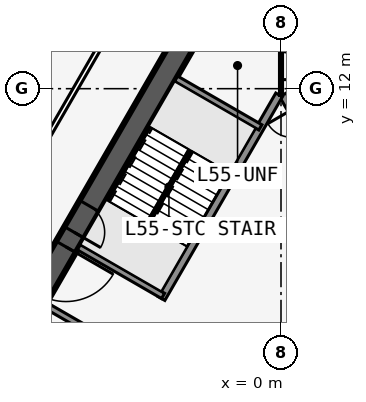
"""IFC4 building model, lengths in metres.
Left out: names, types, materials, properties, quantities, classifications, styles, units other than length and angle.
Written with IfcOpenShell. Run it as: python <this file> out.ifc"""

import sys

from ifc_helpers import new_model, si_unit, direction, frame, frame_2d, origin, place, context, subcontext, project, spatial, rectangle, extrude, element, fill, save


model = new_model("IFC4")
c1 = context("Model", 3, precision=1e-05, world=origin(), true_north=direction((0.0, 1.0)))
c2 = subcontext(c1, "Body", "Model", "MODEL_VIEW")
j1 = project(units=[si_unit("LENGTHUNIT", "METRE"), si_unit("PLANEANGLEUNIT", "RADIAN")], contexts=[c1])
p1 = place(None, origin())
s1 = spatial("IfcSite", under=j1, at=p1, CompositionType="ELEMENT")
p2 = place(p1, origin())
s2 = spatial("IfcBuilding", under=s1, at=p2, CompositionType="ELEMENT")
p3 = place(p2, frame((0.0, 0.0, 208.1)))
s3 = spatial("IfcBuildingStorey", under=s2, at=p3, CompositionType="ELEMENT", Elevation=208.1)
p4 = place(p3, frame((16.5, -9.526, 0.0), z_axis=(0.0, 0.0, 1.0), x_axis=(-0.499999749417, 0.866025548458, 0.0)))
e1 = element("IfcWall", 1, at=p4, inside=s3, PredefinedType="SHEAR", context=c2, shape_type="SweptSolid", body=[
    extrude(rectangle(XDim=33.0, YDim=0.75, at=frame_2d((16.5, 0.0))), origin(), (0.0, 0.0, 1.0), 3.6),
])
p5 = place(p4, frame((14.15, 0.0, 0.0)))
e2 = element("IfcOpeningElement", 2, at=p5, cuts=e1, PredefinedType="OPENING", context=c2, shape_type="SweptSolid", body=[
    extrude(rectangle(XDim=1.8, YDim=2.13, at=frame_2d((0.9, 1.065))), frame((0.0, 0.385, 0.0), z_axis=(0.0, -1.0, 0.0), x_axis=(1.0, 0.0, 0.0)), (0.0, 0.0, 1.0), 0.77),
])
p6 = place(p4, frame((12.6, 0.0, 0.0)))
e3 = element("IfcOpeningElement", 3, at=p6, cuts=e1, PredefinedType="OPENING", context=c2, shape_type="SweptSolid", body=[
    extrude(rectangle(XDim=1.0, YDim=2.13, at=frame_2d((0.5, 1.065))), frame((0.0, 0.385, 0.0), z_axis=(0.0, -1.0, 0.0), x_axis=(1.0, 0.0, 0.0)), (0.0, 0.0, 1.0), 0.77),
])
p7 = place(p3, frame((5.379, 2.586, 0.0), z_axis=(0.0, 0.0, 1.0), x_axis=(-0.500001375892, 0.866024609411, 0.0)))
e4 = element("IfcWall", 4, at=p7, inside=s3, PredefinedType="SOLIDWALL", context=c2, shape_type="SweptSolid", body=[
    extrude(rectangle(XDim=10.633, YDim=0.25, at=frame_2d((5.316, 0.0))), origin(), (0.0, 0.0, 1.0), 3.435),
])
p8 = place(p7, frame((9.164, 0.0, 0.0)))
e5 = element("IfcOpeningElement", 5, at=p8, cuts=e4, PredefinedType="OPENING", context=c2, shape_type="SweptSolid", body=[
    extrude(rectangle(XDim=0.9, YDim=2.13, at=frame_2d((0.45, 1.065))), frame((0.0, 0.135, 0.0), z_axis=(0.0, -1.0, 0.0), x_axis=(1.0, 0.0, 0.0)), (0.0, 0.0, 1.0), 0.27),
])
p9 = place(p7, frame((1.0, 0.0, 0.0)))
e6 = element("IfcOpeningElement", 6, at=p9, cuts=e4, PredefinedType="OPENING", context=c2, shape_type="SweptSolid", body=[
    extrude(rectangle(XDim=1.1, YDim=2.13, at=frame_2d((0.55, 1.065))), frame((0.0, 0.135, 0.0), z_axis=(0.0, -1.0, 0.0), x_axis=(1.0, 0.0, 0.0)), (0.0, 0.0, 1.0), 0.27),
])
p10 = place(p7, frame((3.9, 0.0, 0.0)))
e7 = element("IfcOpeningElement", 7, at=p10, cuts=e4, PredefinedType="OPENING", context=c2, shape_type="SweptSolid", body=[
    extrude(rectangle(XDim=1.1, YDim=2.13, at=frame_2d((0.55, 1.065))), frame((0.0, 0.135, 0.0), z_axis=(0.0, -1.0, 0.0), x_axis=(1.0, 0.0, 0.0)), (0.0, 0.0, 1.0), 0.27),
])
p11 = place(p7, frame((6.8, 0.0, 0.0)))
e8 = element("IfcOpeningElement", 8, at=p11, cuts=e4, PredefinedType="OPENING", context=c2, shape_type="SweptSolid", body=[
    extrude(rectangle(XDim=1.1, YDim=2.13, at=frame_2d((0.55, 1.065))), frame((0.0, 0.135, 0.0), z_axis=(0.0, -1.0, 0.0), x_axis=(1.0, 0.0, 0.0)), (0.0, 0.0, 1.0), 0.27),
])
p12 = place(p3, frame((0.0, 19.052, 0.0), z_axis=(0.0, 0.0, 1.0), x_axis=(-0.499999749417, -0.866025548458, 0.0)))
e9 = element("IfcWall", 9, at=p12, inside=s3, PredefinedType="SHEAR", context=c2, shape_type="SweptSolid", body=[
    extrude(rectangle(XDim=33.0, YDim=0.75, at=frame_2d((16.5, 0.0))), origin(), (0.0, 0.0, 1.0), 3.6),
])
p13 = place(p12, frame((14.15, 0.0, 0.0)))
e10 = element("IfcOpeningElement", 10, at=p13, cuts=e9, PredefinedType="OPENING", context=c2, shape_type="SweptSolid", body=[
    extrude(rectangle(XDim=1.8, YDim=2.13, at=frame_2d((0.9, 1.065))), frame((0.0, 0.385, 0.0), z_axis=(0.0, -1.0, 0.0), x_axis=(1.0, 0.0, 0.0)), (0.0, 0.0, 1.0), 0.77),
])
p14 = place(p12, frame((12.6, 0.0, 0.0)))
e11 = element("IfcOpeningElement", 11, at=p14, cuts=e9, PredefinedType="OPENING", context=c2, shape_type="SweptSolid", body=[
    extrude(rectangle(XDim=1.0, YDim=2.13, at=frame_2d((0.5, 1.065))), frame((0.0, 0.385, 0.0), z_axis=(0.0, -1.0, 0.0), x_axis=(1.0, 0.0, 0.0)), (0.0, 0.0, 1.0), 0.77),
])
p15 = place(p3, frame((-0.062, 11.794, 0.0), z_axis=(0.0, 0.0, 1.0), x_axis=(-0.500006680225, -0.86602154692, 0.0)))
e12 = element("IfcWall", 12, at=p15, inside=s3, PredefinedType="SOLIDWALL", context=c2, shape_type="SweptSolid", body=[
    extrude(rectangle(XDim=7.733, YDim=0.25, at=frame_2d((3.866, 0.0))), origin(), (0.0, 0.0, 1.0), 3.435),
])
for number, where, z_axis, x_axis in (
    (13, (-0.679, 10.727, 0.0), (0.0, 0.0, 1.0), (-0.866, 0.5, 0.0)),
    (14, (-3.879, 5.184, 0.0), (0.0, 0.0, 1.0), (-0.866, 0.5, 0.0)),
    (15, (-4.979, 3.279, 0.0), (0.0, 0.0, 1.0), (-0.866, 0.5, 0.0)),
):
    element("IfcWall", number, at=place(p3, frame(where, z_axis=z_axis, x_axis=x_axis)), inside=s3, PredefinedType="SOLIDWALL", context=c2, shape_type="SweptSolid", body=[
        extrude(rectangle(XDim=3.2, YDim=0.2, at=frame_2d((1.6, 0.0))), origin(), (0.0, 0.0, 1.0), 3.435),
    ])
p16 = place(p3, frame((-0.425, 22.966, 0.0), z_axis=(0.0, 0.0, 1.0), x_axis=(-0.500000265775, -0.866025250339, 0.0)))
e16 = element("IfcWall", 16, at=p16, inside=s3, PredefinedType="PARTITIONING", context=c2, shape_type="SweptSolid", body=[
    extrude(rectangle(XDim=39.354, YDim=0.15, at=frame_2d((19.677, 0.0))), origin(), (0.0, 0.0, 1.0), 3.435),
])
p17 = place(p16, frame((1.102, 0.0, 0.0)))
e17 = element("IfcOpeningElement", 17, at=p17, cuts=e16, PredefinedType="OPENING", context=c2, shape_type="SweptSolid", body=[
    extrude(rectangle(XDim=0.95, YDim=2.13, at=frame_2d((0.475, 1.065))), frame((0.0, 0.085, 0.0), z_axis=(0.0, -1.0, 0.0), x_axis=(1.0, 0.0, 0.0)), (0.0, 0.0, 1.0), 0.17),
])
p18 = place(p16, frame((7.902, 0.0, 0.0)))
e18 = element("IfcOpeningElement", 18, at=p18, cuts=e16, PredefinedType="OPENING", context=c2, shape_type="SweptSolid", body=[
    extrude(rectangle(XDim=0.95, YDim=2.13, at=frame_2d((0.475, 1.065))), frame((0.0, 0.085, 0.0), z_axis=(0.0, -1.0, 0.0), x_axis=(1.0, 0.0, 0.0)), (0.0, 0.0, 1.0), 0.17),
])
p19 = place(p16, frame((17.302, 0.0, 0.0)))
e19 = element("IfcOpeningElement", 19, at=p19, cuts=e16, PredefinedType="OPENING", context=c2, shape_type="SweptSolid", body=[
    extrude(rectangle(XDim=0.95, YDim=2.13, at=frame_2d((0.475, 1.065))), frame((0.0, 0.085, 0.0), z_axis=(0.0, -1.0, 0.0), x_axis=(1.0, 0.0, 0.0)), (0.0, 0.0, 1.0), 0.17),
])
p20 = place(p16, frame((26.702, 0.0, 0.0)))
e20 = element("IfcOpeningElement", 20, at=p20, cuts=e16, PredefinedType="OPENING", context=c2, shape_type="SweptSolid", body=[
    extrude(rectangle(XDim=0.95, YDim=2.13, at=frame_2d((0.475, 1.065))), frame((0.0, 0.085, 0.0), z_axis=(0.0, -1.0, 0.0), x_axis=(1.0, 0.0, 0.0)), (0.0, 0.0, 1.0), 0.17),
])
p21 = place(p16, frame((37.302, 0.0, 0.0)))
e21 = element("IfcOpeningElement", 21, at=p21, cuts=e16, PredefinedType="OPENING", context=c2, shape_type="SweptSolid", body=[
    extrude(rectangle(XDim=0.95, YDim=2.13, at=frame_2d((0.475, 1.065))), frame((0.0, 0.085, 0.0), z_axis=(0.0, -1.0, 0.0), x_axis=(1.0, 0.0, 0.0)), (0.0, 0.0, 1.0), 0.17),
])
p22 = place(p3, frame((0.0, 14.203, 0.0), z_axis=(0.0, 0.0, 1.0), x_axis=(0.0, -1.0, 0.0)))
e22 = element("IfcWall", 22, at=p22, inside=s3, PredefinedType="PARTITIONING", context=c2, shape_type="SweptSolid", body=[
    extrude(rectangle(XDim=2.425, YDim=0.1, at=frame_2d((1.213, 0.0))), origin(), (0.0, 0.0, 1.0), 3.435),
])
p23 = place(p22, frame((1.005, 0.0, 0.0)))
e23 = element("IfcOpeningElement", 23, at=p23, cuts=e22, PredefinedType="OPENING", context=c2, shape_type="SweptSolid", body=[
    extrude(rectangle(XDim=0.9, YDim=2.13, at=frame_2d((0.45, 1.065))), frame((0.0, 0.06, 0.0), z_axis=(0.0, -1.0, 0.0), x_axis=(1.0, 0.0, 0.0)), (0.0, 0.0, 1.0), 0.12),
])
p24 = place(p3, frame((-2.988, 9.978, 0.0), z_axis=(0.0, 0.0, 1.0), x_axis=(-0.499992232847, -0.866029888106, 0.0)))
e24 = element("IfcWall", 24, at=p24, inside=s3, PredefinedType="SOLIDWALL", context=c2, shape_type="SweptSolid", body=[
    extrude(rectangle(XDim=2.794, YDim=0.1, at=frame_2d((1.397, 0.0))), origin(), (0.0, 0.0, 1.0), 3.6),
])
p25 = place(p13, origin())
e25 = element("IfcDoor", 25, at=p25, inside=s3, OperationType="DOUBLE_DOOR_SINGLE_SWING", PredefinedType="DOOR", context=c2, shape_type="SweptSolid", body=[
    extrude(rectangle(XDim=1.8, YDim=2.13, at=frame_2d((0.9, 1.065))), frame((0.0, 0.025, 0.0), z_axis=(0.0, -1.0, 0.0), x_axis=(1.0, 0.0, 0.0)), (0.0, 0.0, 1.0), 0.05),
])
fill(e10, e25)
p26 = place(p14, origin())
e26 = element("IfcDoor", 26, at=p26, inside=s3, OperationType="SINGLE_SWING_RIGHT", PredefinedType="DOOR", context=c2, shape_type="SweptSolid", body=[
    extrude(rectangle(XDim=1.0, YDim=2.13, at=frame_2d((0.5, 1.065))), frame((0.0, 0.025, 0.0), z_axis=(0.0, -1.0, 0.0), x_axis=(1.0, 0.0, 0.0)), (0.0, 0.0, 1.0), 0.05),
])
fill(e11, e26)
p27 = place(p23, origin())
e27 = element("IfcDoor", 27, at=p27, inside=s3, OperationType="SINGLE_SWING_RIGHT", PredefinedType="DOOR", context=c2, shape_type="SweptSolid", body=[
    extrude(rectangle(XDim=0.9, YDim=2.13, at=frame_2d((0.45, 1.065))), frame((0.0, 0.025, 0.0), z_axis=(0.0, -1.0, 0.0), x_axis=(1.0, 0.0, 0.0)), (0.0, 0.0, 1.0), 0.05),
])
fill(e23, e27)
save(model, sys.argv[1])
